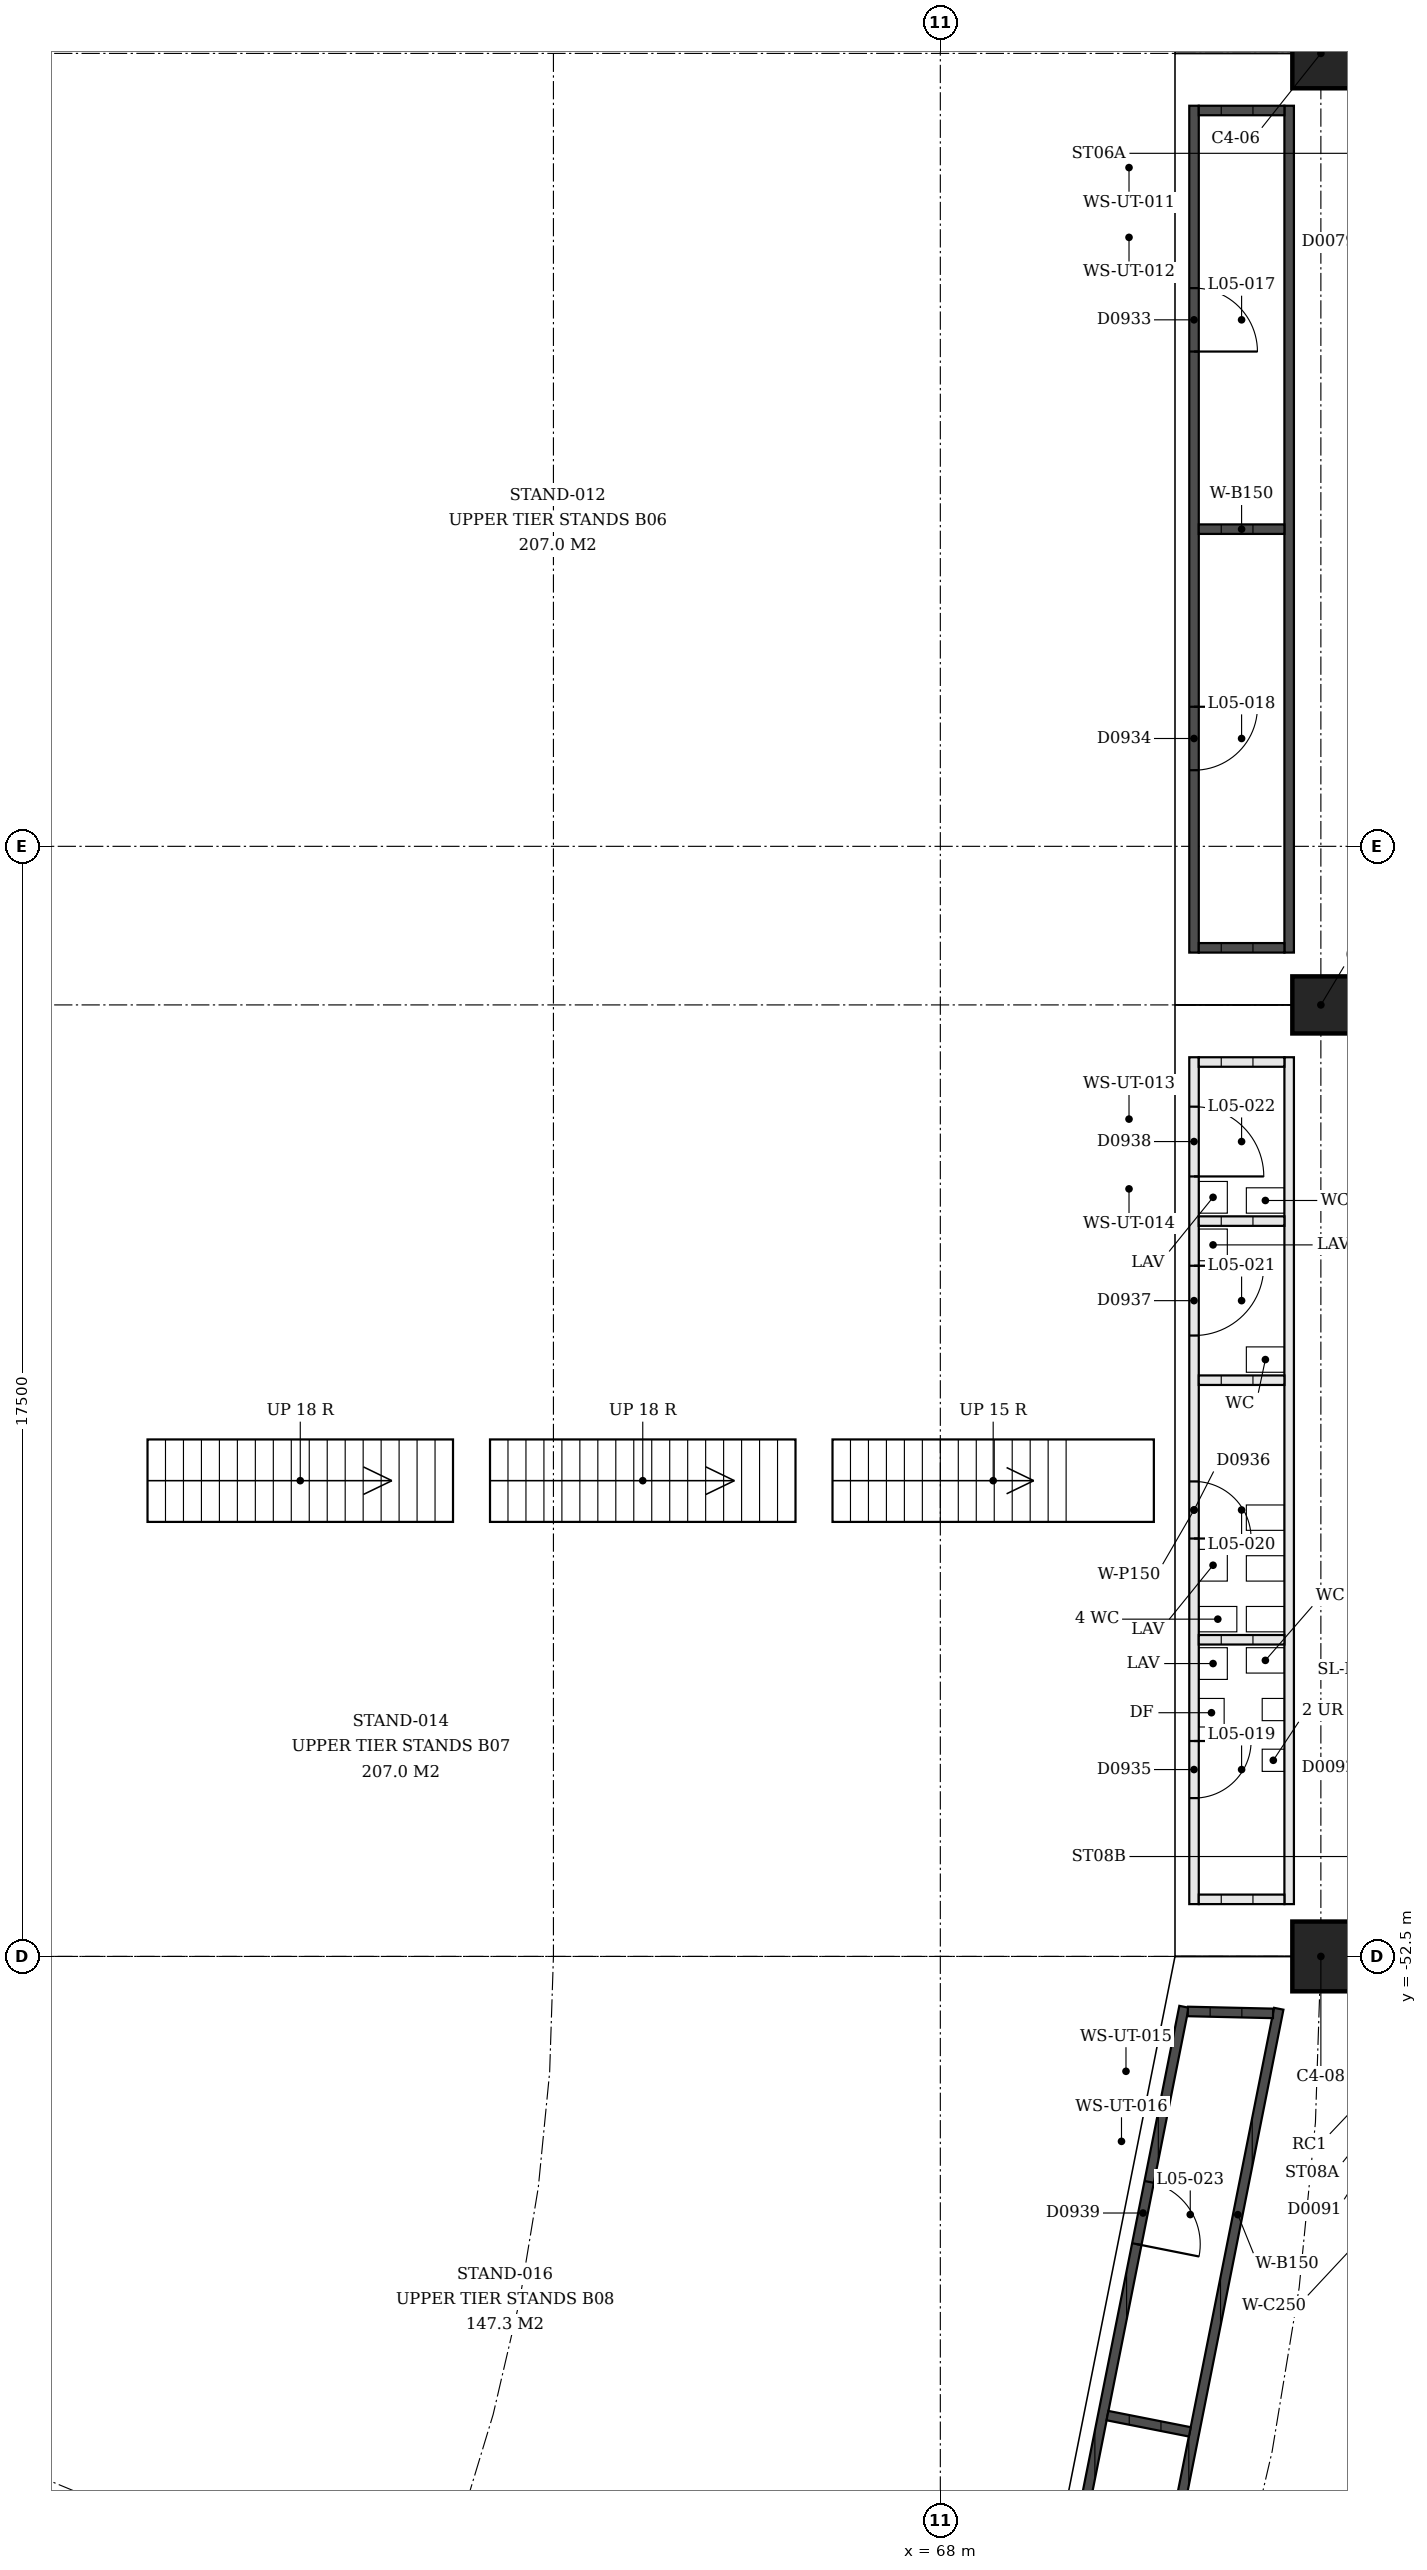
"""IFC4 building model, lengths in metres.
Left out: names, types, materials, properties, quantities, classifications, styles, units other than length and angle.
Written with IfcOpenShell. Run it as: python <this file> out.ifc"""

import sys

from ifc_helpers import new_model, si_unit, direction, frame, frame_2d, origin, origin_2d, place, context, subcontext, project, spatial, rectangle, extrude, element, fill, save


model = new_model("IFC4")
c1 = context("Model", 3, precision=1e-05, world=origin(), true_north=direction((0.0, 1.0)))
c2 = subcontext(c1, "Body", "Model", "MODEL_VIEW")
j1 = project(units=[si_unit("LENGTHUNIT", "METRE"), si_unit("PLANEANGLEUNIT", "RADIAN")], contexts=[c1])
p1 = place(None, origin())
s1 = spatial("IfcSite", under=j1, at=p1, CompositionType="ELEMENT")
p2 = place(p1, origin())
s2 = spatial("IfcBuilding", under=s1, at=p2, CompositionType="ELEMENT")
p3 = place(p2, frame((0.0, 0.0, 22.5)))
s3 = spatial("IfcBuildingStorey", under=s2, at=p3, CompositionType="ELEMENT", Elevation=22.5)
p4 = place(p3, frame((74.0, -22.5, 0.0), z_axis=(0.0, 0.0, 1.0), x_axis=(0.0, 1.0, 0.0)))
e1 = element("IfcColumn", 1, at=p4, inside=s3, PredefinedType="COLUMN", context=c2, shape_type="SweptSolid", body=[
    extrude(rectangle(XDim=1.1, YDim=0.9, at=origin_2d()), origin(), (0.0, 0.0, 1.0), 6.5),
])
p5 = place(p3, frame((74.0, -37.5, 0.0), z_axis=(0.0, 0.0, 1.0), x_axis=(0.0, 1.0, 0.0)))
e2 = element("IfcColumn", 2, at=p5, inside=s3, PredefinedType="COLUMN", context=c2, shape_type="SweptSolid", body=[
    extrude(rectangle(XDim=0.9, YDim=0.9, at=origin_2d()), origin(), (0.0, 0.0, 1.0), 6.5),
])
p6 = place(p3, frame((74.0, -52.5, 0.0), z_axis=(0.0, 0.0, 1.0), x_axis=(0.0, 1.0, 0.0)))
e3 = element("IfcColumn", 3, at=p6, inside=s3, PredefinedType="COLUMN", context=c2, shape_type="SweptSolid", body=[
    extrude(rectangle(XDim=1.1, YDim=0.9, at=origin_2d()), origin(), (0.0, 0.0, 1.0), 6.5),
])
p7 = place(p3, frame((72.0, -23.325, 0.0), z_axis=(0.0, 0.0, 1.0), x_axis=(0.0, -1.0, 0.0)))
e4 = element("IfcWall", 4, at=p7, inside=s3, PredefinedType="SOLIDWALL", context=c2, shape_type="SweptSolid", body=[
    extrude(rectangle(XDim=13.35, YDim=0.15, at=frame_2d((6.675, 0.0))), origin(), (0.0, 0.0, 1.0), 3.0),
])
p8 = place(p7, frame((2.875, 0.0, 0.0)))
e5 = element("IfcOpeningElement", 5, at=p8, cuts=e4, PredefinedType="OPENING", context=c2, shape_type="SweptSolid", body=[
    extrude(rectangle(XDim=1.0, YDim=2.1, at=frame_2d((0.5, 1.05))), frame((0.0, 0.075, 0.0), z_axis=(0.0, -1.0, 0.0), x_axis=(1.0, 0.0, 0.0)), (0.0, 0.0, 1.0), 0.15),
])
p9 = place(p7, frame((9.475, 0.0, 0.0)))
e6 = element("IfcOpeningElement", 6, at=p9, cuts=e4, PredefinedType="OPENING", context=c2, shape_type="SweptSolid", body=[
    extrude(rectangle(XDim=1.0, YDim=2.1, at=frame_2d((0.5, 1.05))), frame((0.0, 0.075, 0.0), z_axis=(0.0, -1.0, 0.0), x_axis=(1.0, 0.0, 0.0)), (0.0, 0.0, 1.0), 0.15),
])
p10 = place(p3, frame((73.5, -23.325, 0.0), z_axis=(0.0, 0.0, 1.0), x_axis=(0.0, -1.0, 0.0)))
e7 = element("IfcWall", 7, at=p10, inside=s3, PredefinedType="SOLIDWALL", context=c2, shape_type="SweptSolid", body=[
    extrude(rectangle(XDim=13.35, YDim=0.15, at=frame_2d((6.675, 0.0))), origin(), (0.0, 0.0, 1.0), 3.0),
])
for number, where, z_axis, x_axis in (
    (8, (72.075, -23.4, 0.0), (0.0, 0.0, 1.0), (1.0, 0.0, 0.0)),
    (9, (72.075, -30.0, 0.0), (0.0, 0.0, 1.0), (1.0, 0.0, 0.0)),
    (10, (72.075, -36.6, 0.0), (0.0, 0.0, 1.0), (1.0, 0.0, 0.0)),
):
    element("IfcWall", number, at=place(p3, frame(where, z_axis=z_axis, x_axis=x_axis)), inside=s3, PredefinedType="SOLIDWALL", context=c2, shape_type="SweptSolid", body=[
        extrude(rectangle(XDim=1.35, YDim=0.15, at=frame_2d((0.675, 0.0))), origin(), (0.0, 0.0, 1.0), 3.0),
    ])
p11 = place(p3, frame((72.0, -51.675, 0.0), z_axis=(0.0, 0.0, 1.0), x_axis=(0.0, 1.0, 0.0)))
e11 = element("IfcWall", 11, at=p11, inside=s3, PredefinedType="PARTITIONING", context=c2, shape_type="SweptSolid", body=[
    extrude(rectangle(XDim=13.35, YDim=0.15, at=frame_2d((6.675, 0.0))), origin(), (0.0, 0.0, 1.0), 3.0),
])
p12 = place(p11, frame((1.671, 0.0, 0.0)))
e12 = element("IfcOpeningElement", 12, at=p12, cuts=e11, PredefinedType="OPENING", context=c2, shape_type="SweptSolid", body=[
    extrude(rectangle(XDim=0.9, YDim=2.1, at=frame_2d((0.45, 1.05))), frame((0.0, 0.075, 0.0), z_axis=(0.0, -1.0, 0.0), x_axis=(1.0, 0.0, 0.0)), (0.0, 0.0, 1.0), 0.15),
])
p13 = place(p11, frame((5.763, 0.0, 0.0)))
e13 = element("IfcOpeningElement", 13, at=p13, cuts=e11, PredefinedType="OPENING", context=c2, shape_type="SweptSolid", body=[
    extrude(rectangle(XDim=0.9, YDim=2.1, at=frame_2d((0.45, 1.05))), frame((0.0, 0.075, 0.0), z_axis=(0.0, -1.0, 0.0), x_axis=(1.0, 0.0, 0.0)), (0.0, 0.0, 1.0), 0.15),
])
p14 = place(p11, frame((8.963, 0.0, 0.0)))
e14 = element("IfcOpeningElement", 14, at=p14, cuts=e11, PredefinedType="OPENING", context=c2, shape_type="SweptSolid", body=[
    extrude(rectangle(XDim=1.1, YDim=2.1, at=frame_2d((0.55, 1.05))), frame((0.0, 0.075, 0.0), z_axis=(0.0, -1.0, 0.0), x_axis=(1.0, 0.0, 0.0)), (0.0, 0.0, 1.0), 0.15),
])
p15 = place(p11, frame((11.471, 0.0, 0.0)))
e15 = element("IfcOpeningElement", 15, at=p15, cuts=e11, PredefinedType="OPENING", context=c2, shape_type="SweptSolid", body=[
    extrude(rectangle(XDim=1.1, YDim=2.1, at=frame_2d((0.55, 1.05))), frame((0.0, 0.075, 0.0), z_axis=(0.0, -1.0, 0.0), x_axis=(1.0, 0.0, 0.0)), (0.0, 0.0, 1.0), 0.15),
])
p16 = place(p3, frame((73.5, -51.675, 0.0), z_axis=(0.0, 0.0, 1.0), x_axis=(0.0, 1.0, 0.0)))
e16 = element("IfcWall", 16, at=p16, inside=s3, PredefinedType="PARTITIONING", context=c2, shape_type="SweptSolid", body=[
    extrude(rectangle(XDim=13.35, YDim=0.15, at=frame_2d((6.675, 0.0))), origin(), (0.0, 0.0, 1.0), 3.0),
])
for number, where, z_axis, x_axis in (
    (17, (72.075, -51.6, 0.0), (0.0, 0.0, 1.0), (1.0, 0.0, 0.0)),
    (18, (72.075, -47.508, 0.0), (0.0, 0.0, 1.0), (1.0, 0.0, 0.0)),
    (19, (72.075, -43.416, 0.0), (0.0, 0.0, 1.0), (1.0, 0.0, 0.0)),
    (20, (72.075, -40.908, 0.0), (0.0, 0.0, 1.0), (1.0, 0.0, 0.0)),
    (21, (72.075, -38.4, 0.0), (0.0, 0.0, 1.0), (1.0, 0.0, 0.0)),
):
    element("IfcWall", number, at=place(p3, frame(where, z_axis=z_axis, x_axis=x_axis)), inside=s3, PredefinedType="PARTITIONING", context=c2, shape_type="SweptSolid", body=[
        extrude(rectangle(XDim=1.35, YDim=0.15, at=frame_2d((0.675, 0.0))), origin(), (0.0, 0.0, 1.0), 3.0),
    ])
p17 = place(p3, frame((71.842, -53.293, 0.0), z_axis=(0.0, 0.0, 1.0), x_axis=(-0.195095631841, -0.980784224198, 0.0)))
e22 = element("IfcWall", 22, at=p17, inside=s3, PredefinedType="SOLIDWALL", context=c2, shape_type="SweptSolid", body=[
    extrude(rectangle(XDim=13.113, YDim=0.15, at=frame_2d((6.557, 0.0))), origin(), (0.0, 0.0, 1.0), 3.0),
])
p18 = place(p17, frame((2.815, 0.0, 0.0)))
e23 = element("IfcOpeningElement", 23, at=p18, cuts=e22, PredefinedType="OPENING", context=c2, shape_type="SweptSolid", body=[
    extrude(rectangle(XDim=1.0, YDim=2.1, at=frame_2d((0.5, 1.05))), frame((0.0, 0.075, 0.0), z_axis=(0.0, -1.0, 0.0), x_axis=(1.0, 0.0, 0.0)), (0.0, 0.0, 1.0), 0.15),
])
p19 = place(p17, frame((9.298, 0.0, 0.0)))
e24 = element("IfcOpeningElement", 24, at=p19, cuts=e22, PredefinedType="OPENING", context=c2, shape_type="SweptSolid", body=[
    extrude(rectangle(XDim=1.0, YDim=2.1, at=frame_2d((0.5, 1.05))), frame((0.0, 0.075, 0.0), z_axis=(0.0, -1.0, 0.0), x_axis=(1.0, 0.0, 0.0)), (0.0, 0.0, 1.0), 0.15),
])
p20 = place(p3, frame((73.336, -53.325, 0.0), z_axis=(0.0, 0.0, 1.0), x_axis=(-0.195086146928, -0.980786110871, 0.0)))
e25 = element("IfcWall", 25, at=p20, inside=s3, PredefinedType="SOLIDWALL", context=c2, shape_type="SweptSolid", body=[
    extrude(rectangle(XDim=13.631, YDim=0.15, at=frame_2d((6.815, 0.0))), origin(), (0.0, 0.0, 1.0), 3.0),
])
p21 = place(p3, frame((71.903, -53.367, 0.0), z_axis=(0.0, 0.0, 1.0), x_axis=(0.999738070999, -0.022886445666, 0.0)))
e26 = element("IfcWall", 26, at=p21, inside=s3, PredefinedType="SOLIDWALL", context=c2, shape_type="SweptSolid", body=[
    extrude(rectangle(XDim=1.344, YDim=0.15, at=frame_2d((0.672, 0.0))), origin(), (0.0, 0.0, 1.0), 3.0),
])
p22 = place(p3, frame((70.635, -59.738, 0.0), z_axis=(0.0, 0.0, 1.0), x_axis=(0.981038980953, -0.193810520485, 0.0)))
e27 = element("IfcWall", 27, at=p22, inside=s3, PredefinedType="SOLIDWALL", context=c2, shape_type="SweptSolid", body=[
    extrude(rectangle(XDim=1.324, YDim=0.15, at=frame_2d((0.662, 0.0))), origin(), (0.0, 0.0, 1.0), 3.0),
])
p23 = place(p8, origin())
e28 = element("IfcDoor", 28, at=p23, inside=s3, OperationType="SINGLE_SWING_LEFT", PredefinedType="DOOR", context=c2, shape_type="SweptSolid", body=[
    extrude(rectangle(XDim=1.0, YDim=2.1, at=frame_2d((0.5, 1.05))), frame((0.0, 0.025, 0.0), z_axis=(0.0, -1.0, 0.0), x_axis=(1.0, 0.0, 0.0)), (0.0, 0.0, 1.0), 0.05),
])
fill(e5, e28)
p24 = place(p9, origin())
e29 = element("IfcDoor", 29, at=p24, inside=s3, OperationType="SINGLE_SWING_RIGHT", PredefinedType="DOOR", context=c2, shape_type="SweptSolid", body=[
    extrude(rectangle(XDim=1.0, YDim=2.1, at=frame_2d((0.5, 1.05))), frame((0.0, 0.025, 0.0), z_axis=(0.0, -1.0, 0.0), x_axis=(1.0, 0.0, 0.0)), (0.0, 0.0, 1.0), 0.05),
])
fill(e6, e29)
p25 = place(p12, origin())
e30 = element("IfcDoor", 30, at=p25, inside=s3, OperationType="SINGLE_SWING_RIGHT", PredefinedType="DOOR", context=c2, shape_type="SweptSolid", body=[
    extrude(rectangle(XDim=0.9, YDim=2.1, at=frame_2d((0.45, 1.05))), frame((0.0, 0.025, 0.0), z_axis=(0.0, -1.0, 0.0), x_axis=(1.0, 0.0, 0.0)), (0.0, 0.0, 1.0), 0.05),
])
fill(e12, e30)
p26 = place(p13, origin())
e31 = element("IfcDoor", 31, at=p26, inside=s3, OperationType="SINGLE_SWING_LEFT", PredefinedType="DOOR", context=c2, shape_type="SweptSolid", body=[
    extrude(rectangle(XDim=0.9, YDim=2.1, at=frame_2d((0.45, 1.05))), frame((0.0, 0.025, 0.0), z_axis=(0.0, -1.0, 0.0), x_axis=(1.0, 0.0, 0.0)), (0.0, 0.0, 1.0), 0.05),
])
fill(e13, e31)
p27 = place(p14, origin())
e32 = element("IfcDoor", 32, at=p27, inside=s3, OperationType="SINGLE_SWING_RIGHT", PredefinedType="DOOR", context=c2, shape_type="SweptSolid", body=[
    extrude(rectangle(XDim=1.1, YDim=2.1, at=frame_2d((0.55, 1.05))), frame((0.0, 0.025, 0.0), z_axis=(0.0, -1.0, 0.0), x_axis=(1.0, 0.0, 0.0)), (0.0, 0.0, 1.0), 0.05),
])
fill(e14, e32)
p28 = place(p15, origin())
e33 = element("IfcDoor", 33, at=p28, inside=s3, OperationType="SINGLE_SWING_LEFT", PredefinedType="DOOR", context=c2, shape_type="SweptSolid", body=[
    extrude(rectangle(XDim=1.1, YDim=2.1, at=frame_2d((0.55, 1.05))), frame((0.0, 0.025, 0.0), z_axis=(0.0, -1.0, 0.0), x_axis=(1.0, 0.0, 0.0)), (0.0, 0.0, 1.0), 0.05),
])
fill(e15, e33)
p29 = place(p18, origin())
e34 = element("IfcDoor", 34, at=p29, inside=s3, OperationType="SINGLE_SWING_LEFT", PredefinedType="DOOR", context=c2, shape_type="SweptSolid", body=[
    extrude(rectangle(XDim=1.0, YDim=2.1, at=frame_2d((0.5, 1.05))), frame((0.0, 0.025, 0.0), z_axis=(0.0, -1.0, 0.0), x_axis=(1.0, 0.0, 0.0)), (0.0, 0.0, 1.0), 0.05),
])
fill(e23, e34)
save(model, sys.argv[1])
